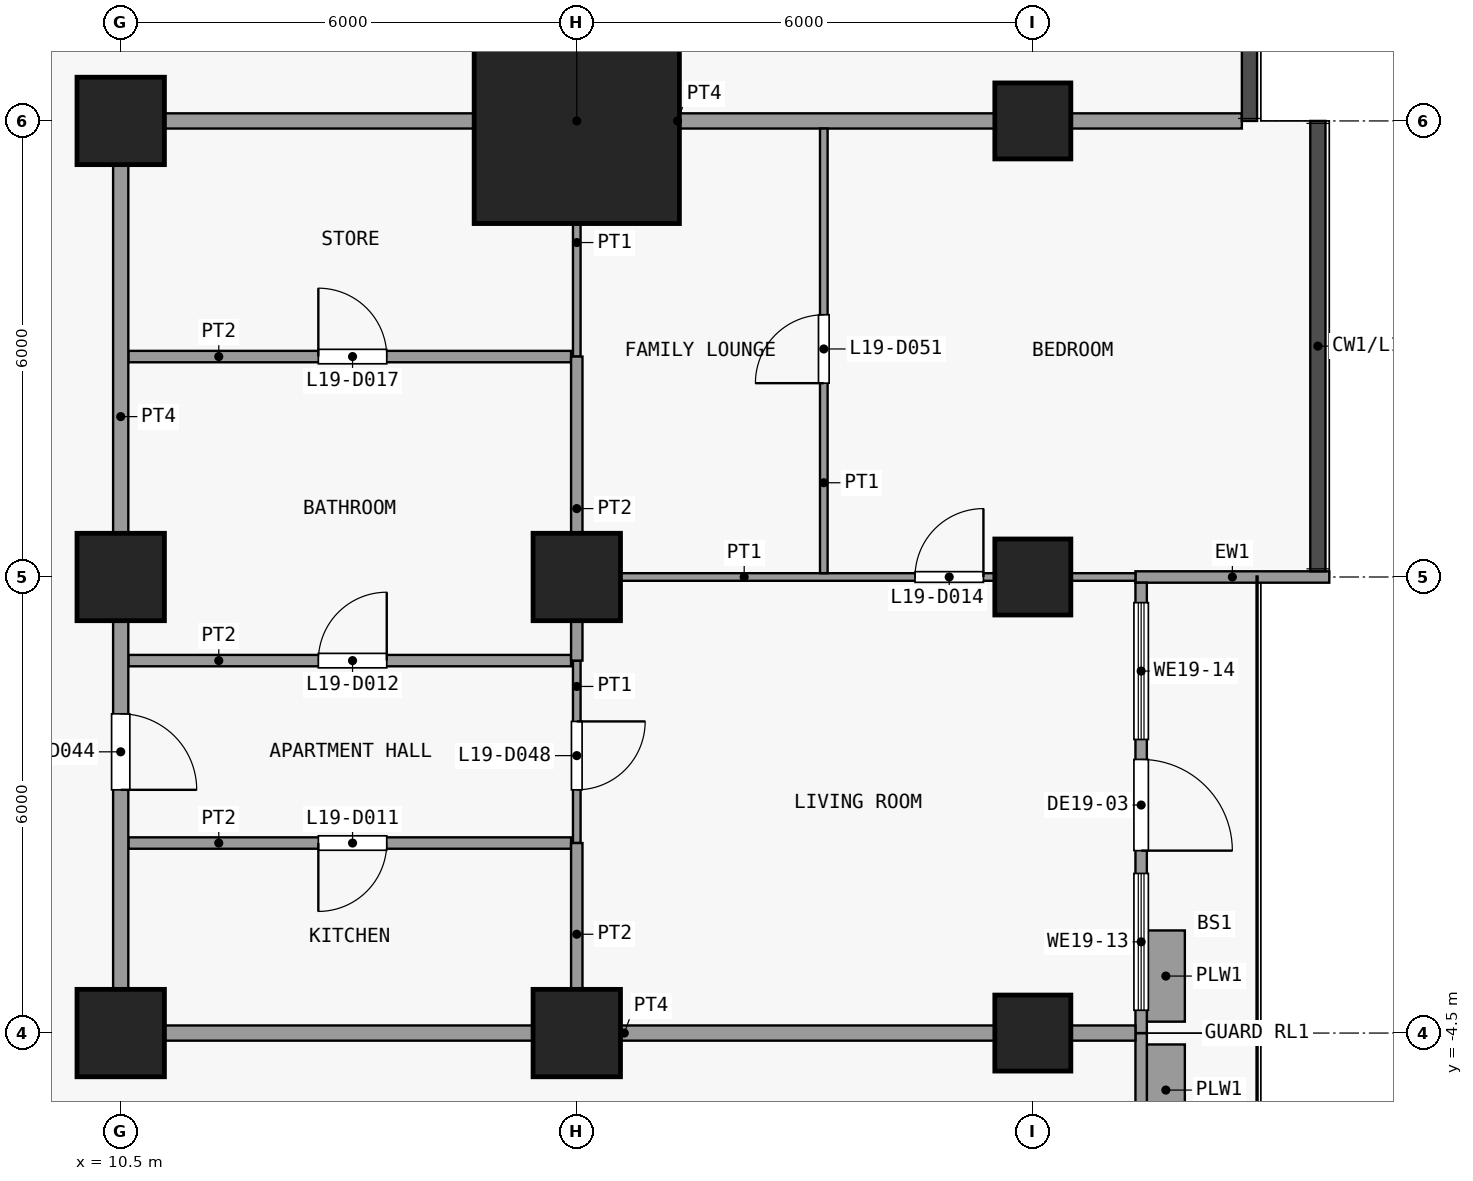
"""IFC4 building model, lengths in metres.
Left out: names, types, materials, properties, quantities, classifications, styles, units other than length and angle.
Written with IfcOpenShell. Run it as: python <this file> out.ifc"""

import sys

from ifc_helpers import new_model, si_unit, direction, frame, frame_2d, origin, origin_2d, place, context, subcontext, project, spatial, rectangle, extrude, element, fill, save


model = new_model("IFC4")
c1 = context("Model", 3, precision=1e-05, world=origin(), true_north=direction((0.0, 1.0)))
c2 = subcontext(c1, "Body", "Model", "MODEL_VIEW")
j1 = project(units=[si_unit("LENGTHUNIT", "METRE"), si_unit("PLANEANGLEUNIT", "RADIAN")], contexts=[c1])
p1 = place(None, origin())
s1 = spatial("IfcSite", under=j1, at=p1, CompositionType="ELEMENT")
p2 = place(p1, origin())
s2 = spatial("IfcBuilding", under=s1, at=p2, CompositionType="ELEMENT")
p3 = place(p2, frame((0.0, 0.0, 81.1)))
s3 = spatial("IfcBuildingStorey", under=s2, at=p3, CompositionType="ELEMENT", Elevation=81.1)
for number, where, z_axis, x_axis in (
    (1, (10.5, -4.5, 0.0), (0.0, 0.0, 1.0), (1.0, 0.0, 0.0)),
    (2, (10.5, 1.5, 0.0), (0.0, 0.0, 1.0), (1.0, 0.0, 0.0)),
    (3, (10.5, 7.5, 0.0), (0.0, 0.0, 1.0), (1.0, 0.0, 0.0)),
    (4, (16.5, -4.5, 0.0), (0.0, 0.0, 1.0), (1.0, 0.0, 0.0)),
    (5, (16.5, 1.5, 0.0), (0.0, 0.0, 1.0), (1.0, 0.0, 0.0)),
):
    element("IfcColumn", number, at=place(p3, frame(where, z_axis=z_axis, x_axis=x_axis)), inside=s3, PredefinedType="COLUMN", context=c2, shape_type="SweptSolid", body=[
        extrude(rectangle(XDim=1.15, YDim=1.15, at=origin_2d()), origin(), (0.0, 0.0, 1.0), 3.6),
    ])
p4 = place(p3, frame((16.5, 7.5, 0.0), z_axis=(0.0, 0.0, 1.0), x_axis=(1.0, 0.0, 0.0)))
e6 = element("IfcColumn", 6, at=p4, inside=s3, PredefinedType="COLUMN", context=c2, shape_type="SweptSolid", body=[
    extrude(rectangle(XDim=2.7, YDim=2.7, at=origin_2d()), origin(), (0.0, 0.0, 1.0), 3.6),
])
for number, where, z_axis, x_axis in (
    (7, (22.5, -4.5, 0.0), (0.0, 0.0, 1.0), (1.0, 0.0, 0.0)),
    (8, (22.5, 1.5, 0.0), (0.0, 0.0, 1.0), (1.0, 0.0, 0.0)),
    (9, (22.5, 7.5, 0.0), (0.0, 0.0, 1.0), (1.0, 0.0, 0.0)),
):
    element("IfcColumn", number, at=place(p3, frame(where, z_axis=z_axis, x_axis=x_axis)), inside=s3, PredefinedType="COLUMN", context=c2, shape_type="SweptSolid", body=[
        extrude(rectangle(XDim=1.0, YDim=1.0, at=origin_2d()), origin(), (0.0, 0.0, 1.0), 3.6),
    ])
p5 = place(p3, frame((23.925, -4.5, 0.0), z_axis=(0.0, 0.0, 1.0), x_axis=(0.0, -1.0, 0.0)))
e10 = element("IfcWall", 10, at=p5, inside=s3, PredefinedType="SOLIDWALL", context=c2, shape_type="SweptSolid", body=[
    extrude(rectangle(XDim=8.925, YDim=0.15, at=frame_2d((4.462, 0.0))), origin(), (0.0, 0.0, 1.0), 3.3),
])
p6 = place(p5, frame((5.6, 0.0, 0.0)))
e11 = element("IfcOpeningElement", 11, at=p6, cuts=e10, PredefinedType="OPENING", context=c2, shape_type="SweptSolid", body=[
    extrude(rectangle(XDim=1.2, YDim=2.4, at=frame_2d((0.6, 1.2))), frame((0.0, 0.085, 0.0), z_axis=(0.0, -1.0, 0.0), x_axis=(1.0, 0.0, 0.0)), (0.0, 0.0, 1.0), 0.17),
])
p7 = place(p5, frame((7.05, 0.0, 0.9)))
e12 = element("IfcOpeningElement", 12, at=p7, cuts=e10, PredefinedType="OPENING", context=c2, shape_type="SweptSolid", body=[
    extrude(rectangle(XDim=1.625, YDim=2.1, at=frame_2d((0.812, 1.05))), frame((0.0, 0.085, 0.0), z_axis=(0.0, -1.0, 0.0), x_axis=(1.0, 0.0, 0.0)), (0.0, 0.0, 1.0), 0.17),
])
p8 = place(p5, frame((1.3, 0.0, 0.9)))
e13 = element("IfcOpeningElement", 13, at=p8, cuts=e10, PredefinedType="OPENING", context=c2, shape_type="SweptSolid", body=[
    extrude(rectangle(XDim=1.85, YDim=2.1, at=frame_2d((0.925, 1.05))), frame((0.0, 0.085, 0.0), z_axis=(0.0, -1.0, 0.0), x_axis=(1.0, 0.0, 0.0)), (0.0, 0.0, 1.0), 0.17),
])
p9 = place(p3, frame((24.25, -5.85, 0.0), z_axis=(0.0, 0.0, 1.0), x_axis=(0.0, 1.0, 0.0)))
e14 = element("IfcWall", 14, at=p9, inside=s3, PredefinedType="USERDEFINED", context=c2, shape_type="SweptSolid", body=[
    extrude(rectangle(XDim=1.2, YDim=0.5, at=frame_2d((0.6, 0.0))), origin(), (0.0, 0.0, 1.0), 0.9),
])
p10 = place(p3, frame((23.85, 1.5, 0.0), z_axis=(0.0, 0.0, 1.0), x_axis=(1.0, 0.0, 0.0)))
e15 = element("IfcWall", 15, at=p10, inside=s3, PredefinedType="SOLIDWALL", context=c2, shape_type="SweptSolid", body=[
    extrude(rectangle(XDim=2.55, YDim=0.15, at=frame_2d((1.275, 0.0))), origin(), (0.0, 0.0, 1.0), 3.3),
])
p11 = place(p3, frame((23.925, 1.425, 0.0), z_axis=(0.0, 0.0, 1.0), x_axis=(0.0, -1.0, 0.0)))
e16 = element("IfcWall", 16, at=p11, inside=s3, PredefinedType="SOLIDWALL", context=c2, shape_type="SweptSolid", body=[
    extrude(rectangle(XDim=5.925, YDim=0.15, at=frame_2d((2.962, 0.0))), origin(), (0.0, 0.0, 1.0), 3.3),
])
p12 = place(p11, frame((2.325, 0.0, 0.0)))
e17 = element("IfcOpeningElement", 17, at=p12, cuts=e16, PredefinedType="OPENING", context=c2, shape_type="SweptSolid", body=[
    extrude(rectangle(XDim=1.2, YDim=2.4, at=frame_2d((0.6, 1.2))), frame((0.0, 0.085, 0.0), z_axis=(0.0, -1.0, 0.0), x_axis=(1.0, 0.0, 0.0)), (0.0, 0.0, 1.0), 0.17),
])
p13 = place(p11, frame((3.825, 0.0, 0.9)))
e18 = element("IfcOpeningElement", 18, at=p13, cuts=e16, PredefinedType="OPENING", context=c2, shape_type="SweptSolid", body=[
    extrude(rectangle(XDim=1.8, YDim=2.1, at=frame_2d((0.9, 1.05))), frame((0.0, 0.085, 0.0), z_axis=(0.0, -1.0, 0.0), x_axis=(1.0, 0.0, 0.0)), (0.0, 0.0, 1.0), 0.17),
])
p14 = place(p11, frame((0.262, 0.0, 0.9)))
e19 = element("IfcOpeningElement", 19, at=p14, cuts=e16, PredefinedType="OPENING", context=c2, shape_type="SweptSolid", body=[
    extrude(rectangle(XDim=1.8, YDim=2.1, at=frame_2d((0.9, 1.05))), frame((0.0, 0.085, 0.0), z_axis=(0.0, -1.0, 0.0), x_axis=(1.0, 0.0, 0.0)), (0.0, 0.0, 1.0), 0.17),
])
p15 = place(p3, frame((24.25, -4.35, 0.0), z_axis=(0.0, 0.0, 1.0), x_axis=(0.0, 1.0, 0.0)))
e20 = element("IfcWall", 20, at=p15, inside=s3, PredefinedType="USERDEFINED", context=c2, shape_type="SweptSolid", body=[
    extrude(rectangle(XDim=1.2, YDim=0.5, at=frame_2d((0.6, 0.0))), origin(), (0.0, 0.0, 1.0), 0.9),
])
p16 = place(p3, frame((10.4, -4.5, 0.0), z_axis=(0.0, 0.0, 1.0), x_axis=(1.0, 0.0, 0.0)))
e21 = element("IfcWall", 21, at=p16, inside=s3, PredefinedType="PARTITIONING", context=c2, shape_type="SweptSolid", body=[
    extrude(rectangle(XDim=13.45, YDim=0.2, at=frame_2d((6.725, 0.0))), origin(), (0.0, 0.0, 1.0), 3.3),
])
p17 = place(p3, frame((10.6, -2.0, 0.0), z_axis=(0.0, 0.0, 1.0), x_axis=(1.0, 0.0, 0.0)))
e22 = element("IfcWall", 22, at=p17, inside=s3, PredefinedType="PARTITIONING", context=c2, shape_type="SweptSolid", body=[
    extrude(rectangle(XDim=5.825, YDim=0.15, at=frame_2d((2.913, 0.0))), origin(), (0.0, 0.0, 1.0), 3.3),
])
p18 = place(p17, frame((2.5, 0.0, 0.0)))
e23 = element("IfcOpeningElement", 23, at=p18, cuts=e22, PredefinedType="OPENING", context=c2, shape_type="SweptSolid", body=[
    extrude(rectangle(XDim=0.9, YDim=2.1, at=frame_2d((0.45, 1.05))), frame((0.0, 0.085, 0.0), z_axis=(0.0, -1.0, 0.0), x_axis=(1.0, 0.0, 0.0)), (0.0, 0.0, 1.0), 0.17),
])
p19 = place(p3, frame((10.6, 0.4, 0.0), z_axis=(0.0, 0.0, 1.0), x_axis=(1.0, 0.0, 0.0)))
e24 = element("IfcWall", 24, at=p19, inside=s3, PredefinedType="PARTITIONING", context=c2, shape_type="SweptSolid", body=[
    extrude(rectangle(XDim=5.825, YDim=0.15, at=frame_2d((2.913, 0.0))), origin(), (0.0, 0.0, 1.0), 3.3),
])
p20 = place(p19, frame((2.5, 0.0, 0.0)))
e25 = element("IfcOpeningElement", 25, at=p20, cuts=e24, PredefinedType="OPENING", context=c2, shape_type="SweptSolid", body=[
    extrude(rectangle(XDim=0.9, YDim=2.1, at=frame_2d((0.45, 1.05))), frame((0.0, 0.085, 0.0), z_axis=(0.0, -1.0, 0.0), x_axis=(1.0, 0.0, 0.0)), (0.0, 0.0, 1.0), 0.17),
])
p21 = place(p3, frame((16.575, 1.5, 0.0), z_axis=(0.0, 0.0, 1.0), x_axis=(1.0, 0.0, 0.0)))
e26 = element("IfcWall", 26, at=p21, inside=s3, PredefinedType="PARTITIONING", context=c2, shape_type="SweptSolid", body=[
    extrude(rectangle(XDim=7.275, YDim=0.1, at=frame_2d((3.638, 0.0))), origin(), (0.0, 0.0, 1.0), 3.3),
])
p22 = place(p21, frame((4.375, 0.0, 0.0)))
e27 = element("IfcOpeningElement", 27, at=p22, cuts=e26, PredefinedType="OPENING", context=c2, shape_type="SweptSolid", body=[
    extrude(rectangle(XDim=0.9, YDim=2.1, at=frame_2d((0.45, 1.05))), frame((0.0, 0.06, 0.0), z_axis=(0.0, -1.0, 0.0), x_axis=(1.0, 0.0, 0.0)), (0.0, 0.0, 1.0), 0.12),
])
p23 = place(p3, frame((10.6, 4.4, 0.0), z_axis=(0.0, 0.0, 1.0), x_axis=(1.0, 0.0, 0.0)))
e28 = element("IfcWall", 28, at=p23, inside=s3, PredefinedType="PARTITIONING", context=c2, shape_type="SweptSolid", body=[
    extrude(rectangle(XDim=5.825, YDim=0.15, at=frame_2d((2.913, 0.0))), origin(), (0.0, 0.0, 1.0), 3.3),
])
p24 = place(p23, frame((2.5, 0.0, 0.0)))
e29 = element("IfcOpeningElement", 29, at=p24, cuts=e28, PredefinedType="OPENING", context=c2, shape_type="SweptSolid", body=[
    extrude(rectangle(XDim=0.9, YDim=2.1, at=frame_2d((0.45, 1.05))), frame((0.0, 0.085, 0.0), z_axis=(0.0, -1.0, 0.0), x_axis=(1.0, 0.0, 0.0)), (0.0, 0.0, 1.0), 0.17),
])
p25 = place(p3, frame((10.4, 7.5, 0.0), z_axis=(0.0, 0.0, 1.0), x_axis=(1.0, 0.0, 0.0)))
e30 = element("IfcWall", 30, at=p25, inside=s3, PredefinedType="PARTITIONING", context=c2, shape_type="SweptSolid", body=[
    extrude(rectangle(XDim=14.85, YDim=0.2, at=frame_2d((7.425, 0.0))), origin(), (0.0, 0.0, 1.0), 3.3),
])
p26 = place(p3, frame((10.5, -4.4, 0.0), z_axis=(0.0, 0.0, 1.0), x_axis=(0.0, 1.0, 0.0)))
e31 = element("IfcWall", 31, at=p26, inside=s3, PredefinedType="PARTITIONING", context=c2, shape_type="SweptSolid", body=[
    extrude(rectangle(XDim=11.8, YDim=0.2, at=frame_2d((5.9, 0.0))), origin(), (0.0, 0.0, 1.0), 3.3),
])
p27 = place(p26, frame((3.1, 0.0, 0.0)))
e32 = element("IfcOpeningElement", 32, at=p27, cuts=e31, PredefinedType="OPENING", context=c2, shape_type="SweptSolid", body=[
    extrude(rectangle(XDim=1.0, YDim=2.1, at=frame_2d((0.5, 1.05))), frame((0.0, 0.11, 0.0), z_axis=(0.0, -1.0, 0.0), x_axis=(1.0, 0.0, 0.0)), (0.0, 0.0, 1.0), 0.22),
])
p28 = place(p3, frame((16.5, -2.0, 0.0), z_axis=(0.0, 0.0, 1.0), x_axis=(0.0, 1.0, 0.0)))
e33 = element("IfcWall", 33, at=p28, inside=s3, PredefinedType="PARTITIONING", context=c2, shape_type="SweptSolid", body=[
    extrude(rectangle(XDim=2.4, YDim=0.1, at=frame_2d((1.2, 0.0))), origin(), (0.0, 0.0, 1.0), 3.3),
])
p29 = place(p28, frame((0.7, 0.0, 0.0)))
e34 = element("IfcOpeningElement", 34, at=p29, cuts=e33, PredefinedType="OPENING", context=c2, shape_type="SweptSolid", body=[
    extrude(rectangle(XDim=0.9, YDim=2.1, at=frame_2d((0.45, 1.05))), frame((0.0, 0.06, 0.0), z_axis=(0.0, -1.0, 0.0), x_axis=(1.0, 0.0, 0.0)), (0.0, 0.0, 1.0), 0.12),
])
p30 = place(p3, frame((16.5, 4.4, 0.0), z_axis=(0.0, 0.0, 1.0), x_axis=(0.0, 1.0, 0.0)))
e35 = element("IfcWall", 35, at=p30, inside=s3, PredefinedType="PARTITIONING", context=c2, shape_type="SweptSolid", body=[
    extrude(rectangle(XDim=3.0, YDim=0.1, at=frame_2d((1.5, 0.0))), origin(), (0.0, 0.0, 1.0), 3.3),
])
p31 = place(p3, frame((16.5, -4.4, 0.0), z_axis=(0.0, 0.0, 1.0), x_axis=(0.0, 1.0, 0.0)))
e36 = element("IfcWall", 36, at=p31, inside=s3, PredefinedType="PARTITIONING", context=c2, shape_type="SweptSolid", body=[
    extrude(rectangle(XDim=2.4, YDim=0.15, at=frame_2d((1.2, 0.0))), origin(), (0.0, 0.0, 1.0), 3.3),
])
p32 = place(p3, frame((16.5, 0.4, 0.0), z_axis=(0.0, 0.0, 1.0), x_axis=(0.0, 1.0, 0.0)))
e37 = element("IfcWall", 37, at=p32, inside=s3, PredefinedType="PARTITIONING", context=c2, shape_type="SweptSolid", body=[
    extrude(rectangle(XDim=4.0, YDim=0.15, at=frame_2d((2.0, 0.0))), origin(), (0.0, 0.0, 1.0), 3.3),
])
p33 = place(p3, frame((19.75, 1.55, 0.0), z_axis=(0.0, 0.0, 1.0), x_axis=(0.0, 1.0, 0.0)))
e38 = element("IfcWall", 38, at=p33, inside=s3, PredefinedType="PARTITIONING", context=c2, shape_type="SweptSolid", body=[
    extrude(rectangle(XDim=5.85, YDim=0.1, at=frame_2d((2.925, 0.0))), origin(), (0.0, 0.0, 1.0), 3.3),
])
p34 = place(p33, frame((2.5, 0.0, 0.0)))
e39 = element("IfcOpeningElement", 39, at=p34, cuts=e38, PredefinedType="OPENING", context=c2, shape_type="SweptSolid", body=[
    extrude(rectangle(XDim=0.9, YDim=2.1, at=frame_2d((0.45, 1.05))), frame((0.0, 0.06, 0.0), z_axis=(0.0, -1.0, 0.0), x_axis=(1.0, 0.0, 0.0)), (0.0, 0.0, 1.0), 0.12),
])
p35 = place(p12, origin())
e40 = element("IfcDoor", 40, at=p35, inside=s3, OperationType="SINGLE_SWING_RIGHT", PredefinedType="DOOR", context=c2, shape_type="SweptSolid", body=[
    extrude(rectangle(XDim=1.2, YDim=2.4, at=frame_2d((0.6, 1.2))), frame((0.0, 0.025, 0.0), z_axis=(0.0, -1.0, 0.0), x_axis=(1.0, 0.0, 0.0)), (0.0, 0.0, 1.0), 0.05),
])
fill(e17, e40)
p36 = place(p13, origin())
e41 = element("IfcWindow", 41, at=p36, inside=s3, PartitioningType="SINGLE_PANEL", PredefinedType="WINDOW", context=c2, shape_type="SweptSolid", body=[
    extrude(rectangle(XDim=1.8, YDim=2.1, at=frame_2d((0.9, 1.05))), frame((0.0, 0.03, 0.0), z_axis=(0.0, -1.0, 0.0), x_axis=(1.0, 0.0, 0.0)), (0.0, 0.0, 1.0), 0.06),
])
fill(e18, e41)
p37 = place(p14, origin())
e42 = element("IfcWindow", 42, at=p37, inside=s3, PartitioningType="SINGLE_PANEL", PredefinedType="WINDOW", context=c2, shape_type="SweptSolid", body=[
    extrude(rectangle(XDim=1.8, YDim=2.1, at=frame_2d((0.9, 1.05))), frame((0.0, 0.03, 0.0), z_axis=(0.0, -1.0, 0.0), x_axis=(1.0, 0.0, 0.0)), (0.0, 0.0, 1.0), 0.06),
])
fill(e19, e42)
p38 = place(p18, origin())
e43 = element("IfcDoor", 43, at=p38, inside=s3, OperationType="SINGLE_SWING_LEFT", PredefinedType="DOOR", context=c2, shape_type="SweptSolid", body=[
    extrude(rectangle(XDim=0.9, YDim=2.1, at=frame_2d((0.45, 1.05))), frame((0.0, 0.025, 0.0), z_axis=(0.0, -1.0, 0.0), x_axis=(1.0, 0.0, 0.0)), (0.0, 0.0, 1.0), 0.05),
])
fill(e23, e43)
p39 = place(p20, origin())
e44 = element("IfcDoor", 44, at=p39, inside=s3, OperationType="SINGLE_SWING_LEFT", PredefinedType="DOOR", context=c2, shape_type="SweptSolid", body=[
    extrude(rectangle(XDim=0.9, YDim=2.1, at=frame_2d((0.45, 1.05))), frame((0.0, 0.025, 0.0), z_axis=(0.0, -1.0, 0.0), x_axis=(1.0, 0.0, 0.0)), (0.0, 0.0, 1.0), 0.05),
])
fill(e25, e44)
p40 = place(p22, origin())
e45 = element("IfcDoor", 45, at=p40, inside=s3, OperationType="SINGLE_SWING_LEFT", PredefinedType="DOOR", context=c2, shape_type="SweptSolid", body=[
    extrude(rectangle(XDim=0.9, YDim=2.1, at=frame_2d((0.45, 1.05))), frame((0.0, 0.025, 0.0), z_axis=(0.0, -1.0, 0.0), x_axis=(1.0, 0.0, 0.0)), (0.0, 0.0, 1.0), 0.05),
])
fill(e27, e45)
p41 = place(p24, origin())
e46 = element("IfcDoor", 46, at=p41, inside=s3, OperationType="SINGLE_SWING_RIGHT", PredefinedType="DOOR", context=c2, shape_type="SweptSolid", body=[
    extrude(rectangle(XDim=0.9, YDim=2.1, at=frame_2d((0.45, 1.05))), frame((0.0, 0.025, 0.0), z_axis=(0.0, -1.0, 0.0), x_axis=(1.0, 0.0, 0.0)), (0.0, 0.0, 1.0), 0.05),
])
fill(e29, e46)
p42 = place(p27, origin())
e47 = element("IfcDoor", 47, at=p42, inside=s3, OperationType="SINGLE_SWING_LEFT", PredefinedType="DOOR", context=c2, shape_type="SweptSolid", body=[
    extrude(rectangle(XDim=1.0, YDim=2.1, at=frame_2d((0.5, 1.05))), frame((0.0, 0.025, 0.0), z_axis=(0.0, -1.0, 0.0), x_axis=(1.0, 0.0, 0.0)), (0.0, 0.0, 1.0), 0.05),
])
fill(e32, e47)
p43 = place(p29, origin())
e48 = element("IfcDoor", 48, at=p43, inside=s3, OperationType="SINGLE_SWING_RIGHT", PredefinedType="DOOR", context=c2, shape_type="SweptSolid", body=[
    extrude(rectangle(XDim=0.9, YDim=2.1, at=frame_2d((0.45, 1.05))), frame((0.0, 0.025, 0.0), z_axis=(0.0, -1.0, 0.0), x_axis=(1.0, 0.0, 0.0)), (0.0, 0.0, 1.0), 0.05),
])
fill(e34, e48)
p44 = place(p34, origin())
e49 = element("IfcDoor", 49, at=p44, inside=s3, OperationType="SINGLE_SWING_RIGHT", PredefinedType="DOOR", context=c2, shape_type="SweptSolid", body=[
    extrude(rectangle(XDim=0.9, YDim=2.1, at=frame_2d((0.45, 1.05))), frame((0.0, 0.025, 0.0), z_axis=(0.0, -1.0, 0.0), x_axis=(1.0, 0.0, 0.0)), (0.0, 0.0, 1.0), 0.05),
])
fill(e39, e49)
save(model, sys.argv[1])
